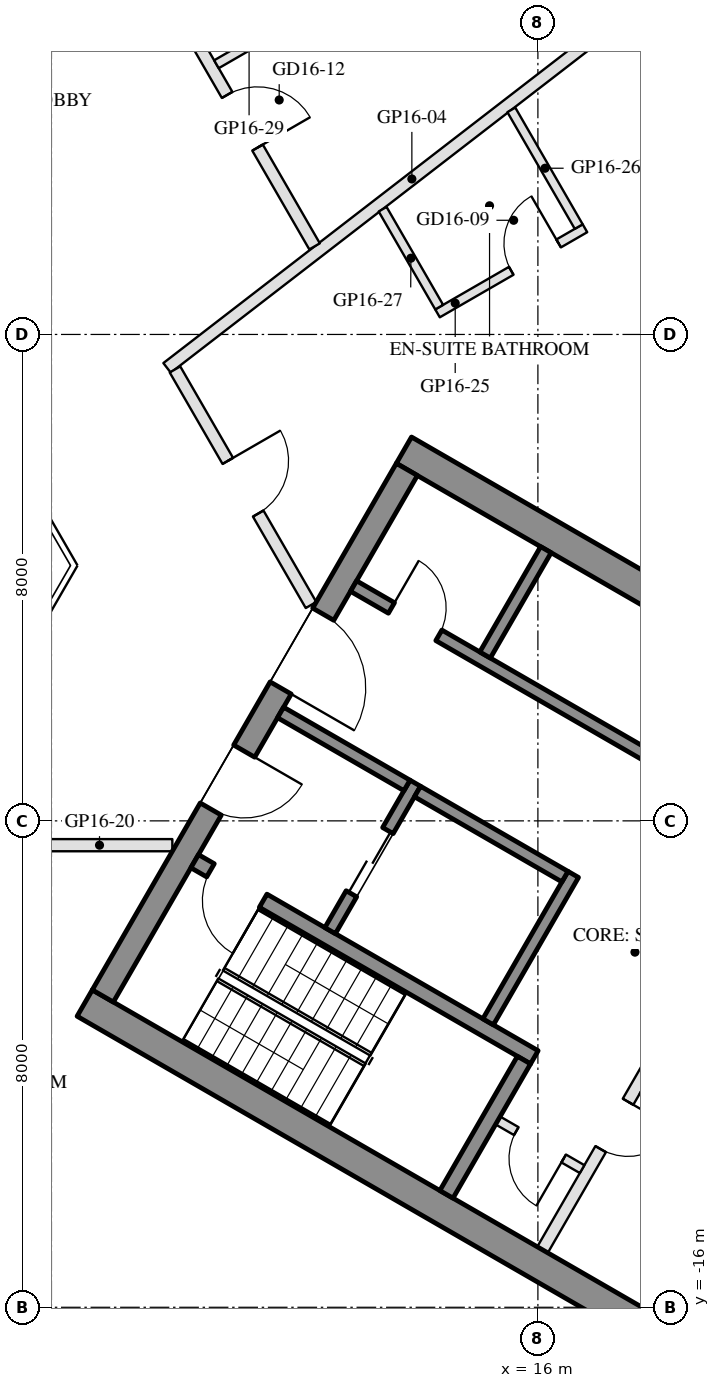
"""IFC4 building model, lengths in metres.
Left out: names, types, materials, properties, quantities, classifications, styles, units other than length and angle.
Written with IfcOpenShell. Run it as: python <this file> out.ifc"""

import sys

from ifc_helpers import new_model, si_unit, direction, frame, frame_2d, origin, place, context, subcontext, project, spatial, rectangle, extrude, element, fill, save


model = new_model("IFC4")
c1 = context("Model", 3, precision=1e-05, world=origin(), true_north=direction((0.0, 1.0)))
c2 = subcontext(c1, "Body", "Model", "MODEL_VIEW")
j1 = project(units=[si_unit("LENGTHUNIT", "METRE"), si_unit("PLANEANGLEUNIT", "RADIAN")], contexts=[c1])
p1 = place(None, origin())
s1 = spatial("IfcSite", under=j1, at=p1, CompositionType="ELEMENT")
p2 = place(p1, origin())
s2 = spatial("IfcBuilding", under=s1, at=p2, CompositionType="ELEMENT")
p3 = place(p2, frame((0.0, 0.0, 179.9)))
s3 = spatial("IfcBuildingStorey", under=s2, at=p3, CompositionType="ELEMENT", Elevation=179.9)
p4 = place(p3, frame((19.729, 2.938, 0.0), z_axis=(0.0, 0.0, 1.0), x_axis=(-0.499976430342, 0.866039011305, 0.0)))
e1 = element("IfcWall", 1, at=p4, inside=s3, PredefinedType="SOLIDWALL", context=c2, shape_type="SweptSolid", body=[
    extrude(rectangle(XDim=6.74, YDim=0.35, at=frame_2d((3.37, 0.0))), origin(), (0.0, 0.0, 1.0), 3.55),
])
p5 = place(p4, frame((0.77, 0.0, 0.3)))
e2 = element("IfcOpeningElement", 2, at=p5, cuts=e1, PredefinedType="OPENING", context=c2, shape_type="SweptSolid", body=[
    extrude(rectangle(XDim=2.0, YDim=2.65, at=frame_2d((1.0, 1.325))), frame((0.0, 0.185, 0.0), z_axis=(0.0, -1.0, 0.0), x_axis=(1.0, 0.0, 0.0)), (0.0, 0.0, 1.0), 0.37),
])
p6 = place(p4, frame((3.734, 0.0, 0.0)))
e3 = element("IfcOpeningElement", 3, at=p6, cuts=e1, PredefinedType="OPENING", context=c2, shape_type="SweptSolid", body=[
    extrude(rectangle(XDim=2.2, YDim=2.4, at=frame_2d((1.1, 1.2))), frame((0.0, 0.185, 0.0), z_axis=(0.0, -1.0, 0.0), x_axis=(1.0, 0.0, 0.0)), (0.0, 0.0, 1.0), 0.37),
])
for number, where, z_axis, x_axis in (
    (4, (8.547, -10.997, 0.0), (0.0, 0.0, 1.0), (0.866, -0.5, 0.0)),
    (5, (13.797, -1.903, 0.0), (0.0, 0.0, 1.0), (0.866, -0.5, 0.0)),
):
    element("IfcWall", number, at=place(p3, frame(where, z_axis=z_axis, x_axis=x_axis)), inside=s3, PredefinedType="SHEAR", context=c2, shape_type="SweptSolid", body=[
        extrude(rectangle(XDim=14.837, YDim=0.5, at=frame_2d((7.418, 0.0))), origin(), (0.0, 0.0, 1.0), 3.5),
    ])
p7 = place(p3, frame((8.845, -10.88, 0.0), z_axis=(0.0, 0.0, 1.0), x_axis=(0.500004234368, 0.866022959057, 0.0)))
e6 = element("IfcWall", 6, at=p7, inside=s3, PredefinedType="SHEAR", context=c2, shape_type="SweptSolid", body=[
    extrude(rectangle(XDim=10.0, YDim=0.4, at=frame_2d((5.0, 0.0))), origin(), (0.0, 0.0, 1.0), 3.5),
])
p8 = place(p7, frame((3.55, 0.0, 0.0)))
e7 = element("IfcOpeningElement", 7, at=p8, cuts=e6, PredefinedType="OPENING", context=c2, shape_type="SweptSolid", body=[
    extrude(rectangle(XDim=1.1, YDim=2.1, at=frame_2d((0.55, 1.05))), frame((0.0, 0.21, 0.0), z_axis=(0.0, -1.0, 0.0), x_axis=(1.0, 0.0, 0.0)), (0.0, 0.0, 1.0), 0.42),
])
p9 = place(p7, frame((5.85, 0.0, 0.0)))
e8 = element("IfcOpeningElement", 8, at=p9, cuts=e6, PredefinedType="OPENING", context=c2, shape_type="SweptSolid", body=[
    extrude(rectangle(XDim=1.4, YDim=2.1, at=frame_2d((0.7, 1.05))), frame((0.0, 0.21, 0.0), z_axis=(0.0, -1.0, 0.0), x_axis=(1.0, 0.0, 0.0)), (0.0, 0.0, 1.0), 0.42),
])
p10 = place(p3, frame((10.356, -8.664, 0.0), z_axis=(0.0, 0.0, 1.0), x_axis=(0.866028629588, -0.499994412703, 0.0)))
e9 = element("IfcWall", 9, at=p10, inside=s3, PredefinedType="SHEAR", context=c2, shape_type="SweptSolid", body=[
    extrude(rectangle(XDim=6.45, YDim=0.25, at=frame_2d((3.225, 0.0))), origin(), (0.0, 0.0, 1.0), 3.5),
])
p11 = place(p10, frame((0.3, 0.0, 0.0)))
e10 = element("IfcOpeningElement", 10, at=p11, cuts=e9, PredefinedType="OPENING", context=c2, shape_type="SweptSolid", body=[
    extrude(rectangle(XDim=1.0, YDim=2.1, at=frame_2d((0.5, 1.05))), frame((0.0, 0.135, 0.0), z_axis=(0.0, -1.0, 0.0), x_axis=(1.0, 0.0, 0.0)), (0.0, 0.0, 1.0), 0.27),
])
p12 = place(p3, frame((14.496, -14.143, 0.0), z_axis=(0.0, 0.0, 1.0), x_axis=(0.500062241894, 0.865989465428, 0.0)))
e11 = element("IfcWall", 11, at=p12, inside=s3, PredefinedType="SHEAR", context=c2, shape_type="SweptSolid", body=[
    extrude(rectangle(XDim=2.55, YDim=0.25, at=frame_2d((1.275, 0.0))), origin(), (0.0, 0.0, 1.0), 3.5),
])
p13 = place(p3, frame((15.181, -11.305, 0.0), z_axis=(0.0, 0.0, 1.0), x_axis=(0.49994636267, 0.866056369097, 0.0)))
e12 = element("IfcWall", 12, at=p13, inside=s3, PredefinedType="SHEAR", context=c2, shape_type="SweptSolid", body=[
    extrude(rectangle(XDim=2.8, YDim=0.2, at=frame_2d((1.4, 0.0))), origin(), (0.0, 0.0, 1.0), 3.5),
])
p14 = place(p3, frame((12.583, -9.805, 0.0), z_axis=(0.0, 0.0, 1.0), x_axis=(0.49994636267, 0.866056369097, 0.0)))
e13 = element("IfcWall", 13, at=p14, inside=s3, PredefinedType="SHEAR", context=c2, shape_type="SweptSolid", body=[
    extrude(rectangle(XDim=2.8, YDim=0.2, at=frame_2d((1.4, 0.0))), origin(), (0.0, 0.0, 1.0), 3.5),
])
p15 = place(p14, frame((0.7, 0.0, 0.0)))
e14 = element("IfcOpeningElement", 14, at=p15, cuts=e13, PredefinedType="OPENING", context=c2, shape_type="SweptSolid", body=[
    extrude(rectangle(XDim=1.2, YDim=2.1, at=frame_2d((0.6, 1.05))), frame((0.0, 0.11, 0.0), z_axis=(0.0, -1.0, 0.0), x_axis=(1.0, 0.0, 0.0)), (0.0, 0.0, 1.0), 0.22),
])
p16 = place(p3, frame((11.768, -6.217, 0.0), z_axis=(0.0, 0.0, 1.0), x_axis=(0.866050077142, -0.499957262057, 0.0)))
e15 = element("IfcWall", 15, at=p16, inside=s3, PredefinedType="SHEAR", context=c2, shape_type="SweptSolid", body=[
    extrude(rectangle(XDim=2.4, YDim=0.2, at=frame_2d((1.2, 0.0))), origin(), (0.0, 0.0, 1.0), 3.5),
])
p17 = place(p3, frame((14.02, -7.517, 0.0), z_axis=(0.0, 0.0, 1.0), x_axis=(0.866034573852, -0.49998411664, 0.0)))
e16 = element("IfcWall", 16, at=p17, inside=s3, PredefinedType="SHEAR", context=c2, shape_type="SweptSolid", body=[
    extrude(rectangle(XDim=2.8, YDim=0.2, at=frame_2d((1.4, 0.0))), origin(), (0.0, 0.0, 1.0), 3.5),
])
p18 = place(p3, frame((12.968, -4.138, 0.0), z_axis=(0.0, 0.0, 1.0), x_axis=(0.866028328073, -0.49999493495, 0.0)))
e17 = element("IfcWall", 17, at=p18, inside=s3, PredefinedType="SHEAR", context=c2, shape_type="SweptSolid", body=[
    extrude(rectangle(XDim=10.16, YDim=0.2, at=frame_2d((5.08, 0.0))), origin(), (0.0, 0.0, 1.0), 3.5),
])
p19 = place(p18, frame((0.72, 0.0, 0.0)))
e18 = element("IfcOpeningElement", 18, at=p19, cuts=e17, PredefinedType="OPENING", context=c2, shape_type="SweptSolid", body=[
    extrude(rectangle(XDim=0.9, YDim=2.1, at=frame_2d((0.45, 1.05))), frame((0.0, 0.11, 0.0), z_axis=(0.0, -1.0, 0.0), x_axis=(1.0, 0.0, 0.0)), (0.0, 0.0, 1.0), 0.22),
])
p20 = place(p18, frame((5.8, 0.0, 0.0)))
e19 = element("IfcOpeningElement", 19, at=p20, cuts=e17, PredefinedType="OPENING", context=c2, shape_type="SweptSolid", body=[
    extrude(rectangle(XDim=0.9, YDim=2.1, at=frame_2d((0.45, 1.05))), frame((0.0, 0.11, 0.0), z_axis=(0.0, -1.0, 0.0), x_axis=(1.0, 0.0, 0.0)), (0.0, 0.0, 1.0), 0.22),
])
p21 = place(p3, frame((15.131, -5.272, 0.0), z_axis=(0.0, 0.0, 1.0), x_axis=(0.499972520799, 0.866041268327, 0.0)))
e20 = element("IfcWall", 20, at=p21, inside=s3, PredefinedType="SHEAR", context=c2, shape_type="SweptSolid", body=[
    extrude(rectangle(XDim=2.0, YDim=0.2, at=frame_2d((1.0, 0.0))), origin(), (0.0, 0.0, 1.0), 3.5),
])
p22 = place(p3, frame((16.076, -15.055, 0.0), z_axis=(0.0, 0.0, 1.0), x_axis=(0.499995103361, 0.866028230842, 0.0)))
e21 = element("IfcWall", 21, at=p22, inside=s3, PredefinedType="PARTITIONING", context=c2, shape_type="SweptSolid", body=[
    extrude(rectangle(XDim=5.4, YDim=0.2, at=frame_2d((2.7, 0.0))), origin(), (0.0, 0.0, 1.0), 3.5),
])
p23 = place(p22, frame((1.913, 0.0, 0.0)))
e22 = element("IfcOpeningElement", 22, at=p23, cuts=e21, PredefinedType="OPENING", context=c2, shape_type="SweptSolid", body=[
    extrude(rectangle(XDim=0.9, YDim=2.1, at=frame_2d((0.45, 1.05))), frame((0.0, 0.11, 0.0), z_axis=(0.0, -1.0, 0.0), x_axis=(1.0, 0.0, 0.0)), (0.0, 0.0, 1.0), 0.22),
])
p24 = place(p22, frame((3.788, 0.0, 0.0)))
e23 = element("IfcOpeningElement", 23, at=p24, cuts=e21, PredefinedType="OPENING", context=c2, shape_type="SweptSolid", body=[
    extrude(rectangle(XDim=0.9, YDim=2.1, at=frame_2d((0.45, 1.05))), frame((0.0, 0.11, 0.0), z_axis=(0.0, -1.0, 0.0), x_axis=(1.0, 0.0, 0.0)), (0.0, 0.0, 1.0), 0.22),
])
p25 = place(p3, frame((15.342, -12.928, 0.0), z_axis=(0.0, 0.0, 1.0), x_axis=(0.865989903783, -0.500061482766, 0.0)))
e24 = element("IfcWall", 24, at=p25, inside=s3, PredefinedType="PARTITIONING", context=c2, shape_type="SweptSolid", body=[
    extrude(rectangle(XDim=1.6, YDim=0.15, at=frame_2d((0.8, 0.0))), origin(), (0.0, 0.0, 1.0), 3.5),
])
p26 = place(p25, frame((0.35, 0.0, 0.0)))
e25 = element("IfcOpeningElement", 25, at=p26, cuts=e24, PredefinedType="OPENING", context=c2, shape_type="SweptSolid", body=[
    extrude(rectangle(XDim=0.9, YDim=2.1, at=frame_2d((0.45, 1.05))), frame((0.0, 0.085, 0.0), z_axis=(0.0, -1.0, 0.0), x_axis=(1.0, 0.0, 0.0)), (0.0, 0.0, 1.0), 0.17),
])
p27 = place(p3, frame((17.713, -12.42, 0.0), z_axis=(0.0, 0.0, 1.0), x_axis=(0.866016523273, -0.500015381182, 0.0)))
e26 = element("IfcWall", 26, at=p27, inside=s3, PredefinedType="PARTITIONING", context=c2, shape_type="SweptSolid", body=[
    extrude(rectangle(XDim=6.95, YDim=0.15, at=frame_2d((3.475, 0.0))), origin(), (0.0, 0.0, 1.0), 3.5),
])
p28 = place(p3, frame((17.953, 5.664, 0.0), z_axis=(0.0, 0.0, 1.0), x_axis=(-0.791642262136, -0.610984884264, 0.0)))
e27 = element("IfcWall", 27, at=p28, inside=s3, PredefinedType="PARTITIONING", context=c2, shape_type="SweptSolid", body=[
    extrude(rectangle(XDim=10.171, YDim=0.2, at=frame_2d((5.085, 0.0))), origin(), (0.0, 0.0, 1.0), 2.95),
])
p29 = place(p3, frame((9.988, -8.4, 0.0), z_axis=(0.0, 0.0, 1.0), x_axis=(-1.0, 0.0, 0.0)))
e28 = element("IfcWall", 28, at=p29, inside=s3, PredefinedType="PARTITIONING", context=c2, shape_type="SweptSolid", body=[
    extrude(rectangle(XDim=5.989, YDim=0.2, at=frame_2d((2.994, 0.0))), origin(), (0.0, 0.0, 1.0), 2.95),
])
p30 = place(p29, frame((2.494, 0.0, 0.0)))
e29 = element("IfcOpeningElement", 29, at=p30, cuts=e28, PredefinedType="OPENING", context=c2, shape_type="SweptSolid", body=[
    extrude(rectangle(XDim=1.0, YDim=2.1, at=frame_2d((0.5, 1.05))), frame((0.0, 0.11, 0.0), z_axis=(0.0, -1.0, 0.0), x_axis=(1.0, 0.0, 0.0)), (0.0, 0.0, 1.0), 0.22),
])
p31 = place(p3, frame((10.032, -0.576, 0.0), z_axis=(0.0, 0.0, 1.0), x_axis=(0.500042097992, -0.866001097133, 0.0)))
e30 = element("IfcWall", 30, at=p31, inside=s3, PredefinedType="PARTITIONING", context=c2, shape_type="SweptSolid", body=[
    extrude(rectangle(XDim=4.474, YDim=0.2, at=frame_2d((2.237, 0.0))), origin(), (0.0, 0.0, 1.0), 2.95),
])
p32 = place(p31, frame((1.737, 0.0, 0.0)))
e31 = element("IfcOpeningElement", 31, at=p32, cuts=e30, PredefinedType="OPENING", context=c2, shape_type="SweptSolid", body=[
    extrude(rectangle(XDim=1.0, YDim=2.1, at=frame_2d((0.5, 1.05))), frame((0.0, 0.11, 0.0), z_axis=(0.0, -1.0, 0.0), x_axis=(1.0, 0.0, 0.0)), (0.0, 0.0, 1.0), 0.22),
])
p33 = place(p3, frame((14.349, 0.347, 0.0), z_axis=(0.0, 0.0, 1.0), x_axis=(0.866034573852, 0.49998411664, 0.0)))
e32 = element("IfcWall", 32, at=p33, inside=s3, PredefinedType="PARTITIONING", context=c2, shape_type="SweptSolid", body=[
    extrude(rectangle(XDim=2.8, YDim=0.15, at=frame_2d((1.4, 0.0))), origin(), (0.0, 0.0, 1.0), 3.55),
])
p34 = place(p33, frame((1.4, 0.0, 0.0)))
e33 = element("IfcOpeningElement", 33, at=p34, cuts=e32, PredefinedType="OPENING", context=c2, shape_type="SweptSolid", body=[
    extrude(rectangle(XDim=0.9, YDim=2.1, at=frame_2d((0.45, 1.05))), frame((0.0, 0.085, 0.0), z_axis=(0.0, -1.0, 0.0), x_axis=(1.0, 0.0, 0.0)), (0.0, 0.0, 1.0), 0.17),
])
p35 = place(p3, frame((16.671, 1.774, 0.0), z_axis=(0.0, 0.0, 1.0), x_axis=(-0.499941746681, 0.866059033742, 0.0)))
e34 = element("IfcWall", 34, at=p35, inside=s3, PredefinedType="PARTITIONING", context=c2, shape_type="SweptSolid", body=[
    extrude(rectangle(XDim=2.217, YDim=0.15, at=frame_2d((1.108, 0.0))), origin(), (0.0, 0.0, 1.0), 3.55),
])
p36 = place(p3, frame((14.377, 0.449, 0.0), z_axis=(0.0, 0.0, 1.0), x_axis=(-0.500063286585, 0.865988862174, 0.0)))
e35 = element("IfcWall", 35, at=p36, inside=s3, PredefinedType="PARTITIONING", context=c2, shape_type="SweptSolid", body=[
    extrude(rectangle(XDim=1.86, YDim=0.15, at=frame_2d((0.93, 0.0))), origin(), (0.0, 0.0, 1.0), 3.55),
])
p37 = place(p3, frame((9.166, 6.924, 0.0), z_axis=(0.0, 0.0, 1.0), x_axis=(0.499997689051, -0.866026738007, 0.0)))
e36 = element("IfcWall", 36, at=p37, inside=s3, PredefinedType="PARTITIONING", context=c2, shape_type="SweptSolid", body=[
    extrude(rectangle(XDim=6.322, YDim=0.2, at=frame_2d((3.161, 0.0))), origin(), (0.0, 0.0, 1.0), 2.95),
])
p38 = place(p37, frame((3.446, 0.0, 0.0)))
e37 = element("IfcOpeningElement", 37, at=p38, cuts=e36, PredefinedType="OPENING", context=c2, shape_type="SweptSolid", body=[
    extrude(rectangle(XDim=1.0, YDim=2.1, at=frame_2d((0.5, 1.05))), frame((0.0, 0.11, 0.0), z_axis=(0.0, -1.0, 0.0), x_axis=(1.0, 0.0, 0.0)), (0.0, 0.0, 1.0), 0.22),
])
p39 = place(p3, frame((10.713, 4.444, 0.0), z_axis=(0.0, 0.0, 1.0), x_axis=(0.86602952684, 0.49999285859, 0.0)))
e38 = element("IfcWall", 38, at=p39, inside=s3, PredefinedType="PARTITIONING", context=c2, shape_type="SweptSolid", body=[
    extrude(rectangle(XDim=3.1, YDim=0.15, at=frame_2d((1.55, 0.0))), origin(), (0.0, 0.0, 1.0), 3.55),
])
p40 = place(p39, frame((1.65, 0.0, 0.0)))
e39 = element("IfcOpeningElement", 39, at=p40, cuts=e38, PredefinedType="OPENING", context=c2, shape_type="SweptSolid", body=[
    extrude(rectangle(XDim=1.0, YDim=2.1, at=frame_2d((0.5, 1.05))), frame((0.0, 0.085, 0.0), z_axis=(0.0, -1.0, 0.0), x_axis=(1.0, 0.0, 0.0)), (0.0, 0.0, 1.0), 0.17),
])
p41 = place(p15, origin())
e40 = element("IfcDoor", 40, at=p41, inside=s3, OperationType="DOUBLE_DOOR_SLIDING", PredefinedType="DOOR", context=c2, shape_type="SweptSolid", body=[
    extrude(rectangle(XDim=1.2, YDim=2.1, at=frame_2d((0.6, 1.05))), frame((0.0, 0.025, 0.0), z_axis=(0.0, -1.0, 0.0), x_axis=(1.0, 0.0, 0.0)), (0.0, 0.0, 1.0), 0.05),
])
fill(e14, e40)
p42 = place(p26, frame((0.9, 0.0, 0.0), z_axis=(0.0, 0.0, 1.0), x_axis=(-1.0, 0.0, 0.0)))
e41 = element("IfcDoor", 41, at=p42, inside=s3, OperationType="SINGLE_SWING_LEFT", PredefinedType="DOOR", context=c2, shape_type="SweptSolid", body=[
    extrude(rectangle(XDim=0.9, YDim=2.1, at=frame_2d((0.45, 1.05))), frame((0.0, 0.025, 0.0), z_axis=(0.0, -1.0, 0.0), x_axis=(1.0, 0.0, 0.0)), (0.0, 0.0, 1.0), 0.05),
])
fill(e25, e41)
p43 = place(p19, origin())
e42 = element("IfcDoor", 42, at=p43, inside=s3, OperationType="SINGLE_SWING_LEFT", PredefinedType="DOOR", context=c2, shape_type="SweptSolid", body=[
    extrude(rectangle(XDim=0.9, YDim=2.1, at=frame_2d((0.45, 1.05))), frame((0.0, 0.025, 0.0), z_axis=(0.0, -1.0, 0.0), x_axis=(1.0, 0.0, 0.0)), (0.0, 0.0, 1.0), 0.05),
])
fill(e18, e42)
p44 = place(p23, frame((0.9, 0.0, 0.0), z_axis=(0.0, 0.0, 1.0), x_axis=(-1.0, 0.0, 0.0)))
e43 = element("IfcDoor", 43, at=p44, inside=s3, OperationType="SINGLE_SWING_LEFT", PredefinedType="DOOR", context=c2, shape_type="SweptSolid", body=[
    extrude(rectangle(XDim=0.9, YDim=2.1, at=frame_2d((0.45, 1.05))), frame((0.0, 0.025, 0.0), z_axis=(0.0, -1.0, 0.0), x_axis=(1.0, 0.0, 0.0)), (0.0, 0.0, 1.0), 0.05),
])
fill(e22, e43)
p45 = place(p8, frame((1.1, 0.0, 0.0), z_axis=(0.0, 0.0, 1.0), x_axis=(-1.0, 0.0, 0.0)))
e44 = element("IfcDoor", 44, at=p45, inside=s3, OperationType="SINGLE_SWING_LEFT", PredefinedType="DOOR", context=c2, shape_type="SweptSolid", body=[
    extrude(rectangle(XDim=1.1, YDim=2.1, at=frame_2d((0.55, 1.05))), frame((0.0, 0.025, 0.0), z_axis=(0.0, -1.0, 0.0), x_axis=(1.0, 0.0, 0.0)), (0.0, 0.0, 1.0), 0.05),
])
fill(e7, e44)
p46 = place(p9, frame((1.4, 0.0, 0.0), z_axis=(0.0, 0.0, 1.0), x_axis=(-1.0, 0.0, 0.0)))
e45 = element("IfcDoor", 45, at=p46, inside=s3, OperationType="DOUBLE_DOOR_SINGLE_SWING", PredefinedType="DOOR", context=c2, shape_type="SweptSolid", body=[
    extrude(rectangle(XDim=1.4, YDim=2.1, at=frame_2d((0.7, 1.05))), frame((0.0, 0.025, 0.0), z_axis=(0.0, -1.0, 0.0), x_axis=(1.0, 0.0, 0.0)), (0.0, 0.0, 1.0), 0.05),
])
fill(e8, e45)
p47 = place(p11, frame((1.0, 0.0, 0.0), z_axis=(0.0, 0.0, 1.0), x_axis=(-1.0, 0.0, 0.0)))
e46 = element("IfcDoor", 46, at=p47, inside=s3, OperationType="SINGLE_SWING_LEFT", PredefinedType="DOOR", context=c2, shape_type="SweptSolid", body=[
    extrude(rectangle(XDim=1.0, YDim=2.1, at=frame_2d((0.5, 1.05))), frame((0.0, 0.025, 0.0), z_axis=(0.0, -1.0, 0.0), x_axis=(1.0, 0.0, 0.0)), (0.0, 0.0, 1.0), 0.05),
])
fill(e10, e46)
p48 = place(p34, origin())
e47 = element("IfcDoor", 47, at=p48, inside=s3, OperationType="SINGLE_SWING_RIGHT", PredefinedType="DOOR", context=c2, shape_type="SweptSolid", body=[
    extrude(rectangle(XDim=0.9, YDim=2.1, at=frame_2d((0.45, 1.05))), frame((0.0, 0.025, 0.0), z_axis=(0.0, -1.0, 0.0), x_axis=(1.0, 0.0, 0.0)), (0.0, 0.0, 1.0), 0.05),
])
fill(e33, e47)
p49 = place(p32, origin())
e48 = element("IfcDoor", 48, at=p49, inside=s3, OperationType="SINGLE_SWING_LEFT", PredefinedType="DOOR", context=c2, shape_type="SweptSolid", body=[
    extrude(rectangle(XDim=1.0, YDim=2.1, at=frame_2d((0.5, 1.05))), frame((0.0, 0.025, 0.0), z_axis=(0.0, -1.0, 0.0), x_axis=(1.0, 0.0, 0.0)), (0.0, 0.0, 1.0), 0.05),
])
fill(e31, e48)
p50 = place(p38, origin())
e49 = element("IfcDoor", 49, at=p50, inside=s3, OperationType="SINGLE_SWING_RIGHT", PredefinedType="DOOR", context=c2, shape_type="SweptSolid", body=[
    extrude(rectangle(XDim=1.0, YDim=2.1, at=frame_2d((0.5, 1.05))), frame((0.0, 0.025, 0.0), z_axis=(0.0, -1.0, 0.0), x_axis=(1.0, 0.0, 0.0)), (0.0, 0.0, 1.0), 0.05),
])
fill(e37, e49)
save(model, sys.argv[1])
